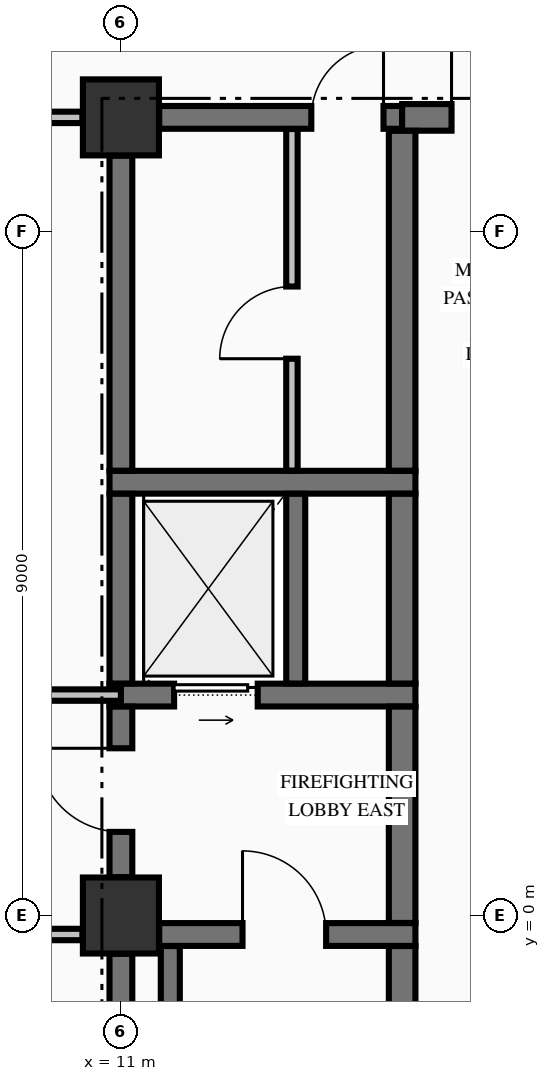
"""IFC4 building model, lengths in metres.
Left out: names, types, materials, properties, quantities, classifications, styles, units other than length and angle.
Written with IfcOpenShell. Run it as: python <this file> out.ifc"""

import sys

from ifc_helpers import new_model, si_unit, direction, frame, frame_2d, origin, origin_2d, place, context, subcontext, project, spatial, rectangle, extrude, element, fill, save


model = new_model("IFC4")
c1 = context("Model", 3, precision=1e-05, world=origin(), true_north=direction((0.0, 1.0)))
c2 = subcontext(c1, "Body", "Model", "MODEL_VIEW")
j1 = project(units=[si_unit("LENGTHUNIT", "METRE"), si_unit("PLANEANGLEUNIT", "RADIAN")], contexts=[c1])
p1 = place(None, origin())
s1 = spatial("IfcSite", under=j1, at=p1, CompositionType="ELEMENT")
p2 = place(p1, origin())
s2 = spatial("IfcBuilding", under=s1, at=p2, CompositionType="ELEMENT")
p3 = place(p2, frame((0.0, 0.0, 128.49)))
s3 = spatial("IfcBuildingStorey", under=s2, at=p3, CompositionType="ELEMENT", Elevation=128.49)
for number, where, z_axis, x_axis in (
    (1, (11.0, 0.0, -0.25), (0.0, 0.0, 1.0), (1.0, 0.0, 0.0)),
    (2, (11.0, 10.5, -0.25), (0.0, 0.0, 1.0), (1.0, 0.0, 0.0)),
):
    element("IfcColumn", number, at=place(p3, frame(where, z_axis=z_axis, x_axis=x_axis)), inside=s3, PredefinedType="COLUMN", context=c2, shape_type="SweptSolid", body=[
        extrude(rectangle(XDim=1.0, YDim=1.0, at=origin_2d()), origin(), (0.0, 0.0, 1.0), 3.57),
    ])
p4 = place(p3, frame((11.504, -0.25, 0.0), z_axis=(0.0, 0.0, 1.0), x_axis=(1.0, 0.0, 0.0)))
e3 = element("IfcWall", 3, at=p4, inside=s3, PredefinedType="SHEAR", context=c2, shape_type="SweptSolid", body=[
    extrude(rectangle(XDim=3.371, YDim=0.3, at=frame_2d((1.686, 0.0))), origin(), (0.0, 0.0, 1.0), 3.32),
])
p5 = place(p4, frame((1.096, 0.0, 0.0)))
e4 = element("IfcOpeningElement", 4, at=p5, cuts=e3, PredefinedType="OPENING", context=c2, shape_type="SweptSolid", body=[
    extrude(rectangle(XDim=1.1, YDim=2.15, at=frame_2d((0.55, 1.075))), frame((0.0, 0.16, 0.0), z_axis=(0.0, -1.0, 0.0), x_axis=(1.0, 0.0, 0.0)), (0.0, 0.0, 1.0), 0.32),
])
p6 = place(p3, frame((10.85, 2.9, 0.0), z_axis=(0.0, 0.0, 1.0), x_axis=(1.0, 0.0, 0.0)))
e5 = element("IfcWall", 5, at=p6, inside=s3, PredefinedType="SHEAR", context=c2, shape_type="SweptSolid", body=[
    extrude(rectangle(XDim=4.025, YDim=0.3, at=frame_2d((2.012, 0.0))), origin(), (0.0, 0.0, 1.0), 3.32),
])
p7 = place(p6, frame((0.85, 0.0, 0.0)))
e6 = element("IfcOpeningElement", 6, at=p7, cuts=e5, PredefinedType="OPENING", context=c2, shape_type="SweptSolid", body=[
    extrude(rectangle(XDim=1.1, YDim=2.2, at=frame_2d((0.55, 1.1))), frame((0.0, 0.16, 0.0), z_axis=(0.0, -1.0, 0.0), x_axis=(1.0, 0.0, 0.0)), (0.0, 0.0, 1.0), 0.32),
])
p8 = place(p3, frame((10.85, 5.7, 0.0), z_axis=(0.0, 0.0, 1.0), x_axis=(1.0, 0.0, 0.0)))
e7 = element("IfcWall", 7, at=p8, inside=s3, PredefinedType="SHEAR", context=c2, shape_type="SweptSolid", body=[
    extrude(rectangle(XDim=4.025, YDim=0.3, at=frame_2d((2.012, 0.0))), origin(), (0.0, 0.0, 1.0), 3.32),
])
p9 = place(p3, frame((11.504, 10.5, 0.0), z_axis=(0.0, 0.0, 1.0), x_axis=(1.0, 0.0, 0.0)))
e8 = element("IfcWall", 8, at=p9, inside=s3, PredefinedType="SHEAR", context=c2, shape_type="SweptSolid", body=[
    extrude(rectangle(XDim=3.196, YDim=0.3, at=frame_2d((1.598, 0.0))), origin(), (0.0, 0.0, 1.0), 3.32),
])
p10 = place(p9, frame((2.001, 0.0, 0.0)))
e9 = element("IfcOpeningElement", 9, at=p10, cuts=e8, PredefinedType="OPENING", context=c2, shape_type="SweptSolid", body=[
    extrude(rectangle(XDim=0.95, YDim=2.15, at=frame_2d((0.475, 1.075))), frame((0.0, 0.16, 0.0), z_axis=(0.0, -1.0, 0.0), x_axis=(1.0, 0.0, 0.0)), (0.0, 0.0, 1.0), 0.32),
])
p11 = place(p3, frame((14.7, 10.5, 0.0), z_axis=(0.0, 0.0, 1.0), x_axis=(1.0, 0.0, 0.0)))
e10 = element("IfcWall", 10, at=p11, inside=s3, PredefinedType="SHEAR", context=c2, shape_type="SweptSolid", body=[
    extrude(rectangle(XDim=4.796, YDim=0.35, at=frame_2d((2.398, 0.0))), origin(), (0.0, 0.0, 1.0), 3.32),
])
p12 = place(p11, frame((0.65, 0.0, 0.0)))
e11 = element("IfcOpeningElement", 11, at=p12, cuts=e10, PredefinedType="OPENING", context=c2, shape_type="SweptSolid", body=[
    extrude(rectangle(XDim=1.2, YDim=2.15, at=frame_2d((0.6, 1.075))), frame((0.0, 0.185, 0.0), z_axis=(0.0, -1.0, 0.0), x_axis=(1.0, 0.0, 0.0)), (0.0, 0.0, 1.0), 0.37),
])
p13 = place(p11, frame((3.25, 0.0, 0.0)))
e12 = element("IfcOpeningElement", 12, at=p13, cuts=e10, PredefinedType="OPENING", context=c2, shape_type="SweptSolid", body=[
    extrude(rectangle(XDim=0.9, YDim=2.15, at=frame_2d((0.45, 1.075))), frame((0.0, 0.185, 0.0), z_axis=(0.0, -1.0, 0.0), x_axis=(1.0, 0.0, 0.0)), (0.0, 0.0, 1.0), 0.37),
])
p14 = place(p3, frame((-10.494, -0.25, 0.0), z_axis=(0.0, 0.0, 1.0), x_axis=(1.0, 0.0, 0.0)))
e13 = element("IfcWall", 13, at=p14, inside=s3, PredefinedType="PARTITIONING", context=c2, shape_type="SweptSolid", body=[
    extrude(rectangle(XDim=20.988, YDim=0.15, at=frame_2d((10.494, 0.0))), origin(), (0.0, 0.0, 1.0), 3.32),
])
p15 = place(p14, frame((5.444, 0.0, 0.0)))
e14 = element("IfcOpeningElement", 14, at=p15, cuts=e13, PredefinedType="OPENING", context=c2, shape_type="SweptSolid", body=[
    extrude(rectangle(XDim=1.1, YDim=2.15, at=frame_2d((0.55, 1.075))), frame((0.0, 0.085, 0.0), z_axis=(0.0, -1.0, 0.0), x_axis=(1.0, 0.0, 0.0)), (0.0, 0.0, 1.0), 0.17),
])
p16 = place(p14, frame((1.669, 0.0, 0.0)))
e15 = element("IfcOpeningElement", 15, at=p16, cuts=e13, PredefinedType="OPENING", context=c2, shape_type="SweptSolid", body=[
    extrude(rectangle(XDim=1.05, YDim=2.15, at=frame_2d((0.525, 1.075))), frame((0.0, 0.085, 0.0), z_axis=(0.0, -1.0, 0.0), x_axis=(1.0, 0.0, 0.0)), (0.0, 0.0, 1.0), 0.17),
])
p17 = place(p14, frame((13.819, 0.0, 0.0)))
e16 = element("IfcOpeningElement", 16, at=p17, cuts=e13, PredefinedType="OPENING", context=c2, shape_type="SweptSolid", body=[
    extrude(rectangle(XDim=0.95, YDim=2.15, at=frame_2d((0.475, 1.075))), frame((0.0, 0.085, 0.0), z_axis=(0.0, -1.0, 0.0), x_axis=(1.0, 0.0, 0.0)), (0.0, 0.0, 1.0), 0.17),
])
p18 = place(p3, frame((-11.0, 2.9, 0.0), z_axis=(0.0, 0.0, 1.0), x_axis=(1.0, 0.0, 0.0)))
e17 = element("IfcWall", 17, at=p18, inside=s3, PredefinedType="PARTITIONING", context=c2, shape_type="SweptSolid", body=[
    extrude(rectangle(XDim=22.0, YDim=0.15, at=frame_2d((11.0, 0.0))), origin(), (0.0, 0.0, 1.0), 3.32),
])
p19 = place(p18, frame((5.95, 0.0, 0.0)))
e18 = element("IfcOpeningElement", 18, at=p19, cuts=e17, PredefinedType="OPENING", context=c2, shape_type="SweptSolid", body=[
    extrude(rectangle(XDim=1.1, YDim=2.15, at=frame_2d((0.55, 1.075))), frame((0.0, 0.085, 0.0), z_axis=(0.0, -1.0, 0.0), x_axis=(1.0, 0.0, 0.0)), (0.0, 0.0, 1.0), 0.17),
])
p20 = place(p18, frame((2.175, 0.0, 0.0)))
e19 = element("IfcOpeningElement", 19, at=p20, cuts=e17, PredefinedType="OPENING", context=c2, shape_type="SweptSolid", body=[
    extrude(rectangle(XDim=1.05, YDim=2.15, at=frame_2d((0.525, 1.075))), frame((0.0, 0.085, 0.0), z_axis=(0.0, -1.0, 0.0), x_axis=(1.0, 0.0, 0.0)), (0.0, 0.0, 1.0), 0.17),
])
p21 = place(p18, frame((14.25, 0.0, 0.0)))
e20 = element("IfcOpeningElement", 20, at=p21, cuts=e17, PredefinedType="OPENING", context=c2, shape_type="SweptSolid", body=[
    extrude(rectangle(XDim=1.1, YDim=2.15, at=frame_2d((0.55, 1.075))), frame((0.0, 0.085, 0.0), z_axis=(0.0, -1.0, 0.0), x_axis=(1.0, 0.0, 0.0)), (0.0, 0.0, 1.0), 0.17),
])
p22 = place(p3, frame((-10.494, 10.5, 0.0), z_axis=(0.0, 0.0, 1.0), x_axis=(1.0, 0.0, 0.0)))
e21 = element("IfcWall", 21, at=p22, inside=s3, PredefinedType="PARTITIONING", context=c2, shape_type="SweptSolid", body=[
    extrude(rectangle(XDim=20.988, YDim=0.15, at=frame_2d((10.494, 0.0))), origin(), (0.0, 0.0, 1.0), 3.32),
])
p23 = place(p22, frame((5.444, 0.0, 0.0)))
e22 = element("IfcOpeningElement", 22, at=p23, cuts=e21, PredefinedType="OPENING", context=c2, shape_type="SweptSolid", body=[
    extrude(rectangle(XDim=1.1, YDim=2.15, at=frame_2d((0.55, 1.075))), frame((0.0, 0.085, 0.0), z_axis=(0.0, -1.0, 0.0), x_axis=(1.0, 0.0, 0.0)), (0.0, 0.0, 1.0), 0.17),
])
p24 = place(p3, frame((11.0, -9.446, 0.0), z_axis=(0.0, 0.0, 1.0), x_axis=(0.0, 1.0, 0.0)))
e23 = element("IfcWall", 23, at=p24, inside=s3, PredefinedType="SHEAR", context=c2, shape_type="SweptSolid", body=[
    extrude(rectangle(XDim=8.942, YDim=0.3, at=frame_2d((4.471, 0.0))), origin(), (0.0, 0.0, 1.0), 3.32),
])
p25 = place(p3, frame((11.0, 0.504, 0.0), z_axis=(0.0, 0.0, 1.0), x_axis=(0.0, 1.0, 0.0)))
e24 = element("IfcWall", 24, at=p25, inside=s3, PredefinedType="SHEAR", context=c2, shape_type="SweptSolid", body=[
    extrude(rectangle(XDim=2.244, YDim=0.3, at=frame_2d((1.122, 0.0))), origin(), (0.0, 0.0, 1.0), 3.32),
])
p26 = place(p25, frame((0.596, 0.0, 0.0)))
e25 = element("IfcOpeningElement", 25, at=p26, cuts=e24, PredefinedType="OPENING", context=c2, shape_type="SweptSolid", body=[
    extrude(rectangle(XDim=1.1, YDim=2.15, at=frame_2d((0.55, 1.075))), frame((0.0, 0.16, 0.0), z_axis=(0.0, -1.0, 0.0), x_axis=(1.0, 0.0, 0.0)), (0.0, 0.0, 1.0), 0.32),
])
p27 = place(p3, frame((11.0, 3.052, 0.0), z_axis=(0.0, 0.0, 1.0), x_axis=(0.0, 1.0, 0.0)))
e26 = element("IfcWall", 26, at=p27, inside=s3, PredefinedType="SHEAR", context=c2, shape_type="SweptSolid", body=[
    extrude(rectangle(XDim=2.496, YDim=0.3, at=frame_2d((1.248, 0.0))), origin(), (0.0, 0.0, 1.0), 3.32),
])
p28 = place(p3, frame((11.0, 5.852, 0.0), z_axis=(0.0, 0.0, 1.0), x_axis=(0.0, 1.0, 0.0)))
e27 = element("IfcWall", 27, at=p28, inside=s3, PredefinedType="SHEAR", context=c2, shape_type="SweptSolid", body=[
    extrude(rectangle(XDim=4.144, YDim=0.3, at=frame_2d((2.072, 0.0))), origin(), (0.0, 0.0, 1.0), 3.32),
])
p29 = place(p3, frame((11.65, -9.798, 0.0), z_axis=(0.0, 0.0, 1.0), x_axis=(0.0, 1.0, 0.0)))
e28 = element("IfcWall", 28, at=p29, inside=s3, PredefinedType="SOLIDWALL", context=c2, shape_type="SweptSolid", body=[
    extrude(rectangle(XDim=9.396, YDim=0.25, at=frame_2d((4.698, 0.0))), origin(), (0.0, 0.0, 1.0), 3.32),
])
p30 = place(p3, frame((13.3, 3.052, 0.0), z_axis=(0.0, 0.0, 1.0), x_axis=(0.0, 1.0, 0.0)))
e29 = element("IfcWall", 29, at=p30, inside=s3, PredefinedType="SOLIDWALL", context=c2, shape_type="SweptSolid", body=[
    extrude(rectangle(XDim=2.496, YDim=0.25, at=frame_2d((1.248, 0.0))), origin(), (0.0, 0.0, 1.0), 3.32),
])
p31 = place(p3, frame((14.7, -9.773, 0.0), z_axis=(0.0, 0.0, 1.0), x_axis=(0.0, 1.0, 0.0)))
e30 = element("IfcWall", 30, at=p31, inside=s3, PredefinedType="SHEAR", context=c2, shape_type="SweptSolid", body=[
    extrude(rectangle(XDim=9.371, YDim=0.35, at=frame_2d((4.686, 0.0))), origin(), (0.0, 0.0, 1.0), 3.32),
])
p32 = place(p3, frame((14.7, -0.098, 0.0), z_axis=(0.0, 0.0, 1.0), x_axis=(0.0, 1.0, 0.0)))
e31 = element("IfcWall", 31, at=p32, inside=s3, PredefinedType="SHEAR", context=c2, shape_type="SweptSolid", body=[
    extrude(rectangle(XDim=2.846, YDim=0.35, at=frame_2d((1.423, 0.0))), origin(), (0.0, 0.0, 1.0), 3.32),
])
p33 = place(p3, frame((14.7, 3.052, 0.0), z_axis=(0.0, 0.0, 1.0), x_axis=(0.0, 1.0, 0.0)))
e32 = element("IfcWall", 32, at=p33, inside=s3, PredefinedType="SHEAR", context=c2, shape_type="SweptSolid", body=[
    extrude(rectangle(XDim=2.496, YDim=0.35, at=frame_2d((1.248, 0.0))), origin(), (0.0, 0.0, 1.0), 3.32),
])
p34 = place(p3, frame((14.7, 5.852, 0.0), z_axis=(0.0, 0.0, 1.0), x_axis=(0.0, 1.0, 0.0)))
e33 = element("IfcWall", 33, at=p34, inside=s3, PredefinedType="SHEAR", context=c2, shape_type="SweptSolid", body=[
    extrude(rectangle(XDim=4.471, YDim=0.35, at=frame_2d((2.235, 0.0))), origin(), (0.0, 0.0, 1.0), 3.32),
])
p35 = place(p3, frame((13.25, 5.853, 0.0), z_axis=(0.0, 0.0, 1.0), x_axis=(0.0, 1.0, 0.0)))
e34 = element("IfcWall", 34, at=p35, inside=s3, PredefinedType="PARTITIONING", context=c2, shape_type="SweptSolid", body=[
    extrude(rectangle(XDim=4.494, YDim=0.15, at=frame_2d((2.247, 0.0))), origin(), (0.0, 0.0, 1.0), 3.32),
])
p36 = place(p35, frame((1.472, 0.0, 0.0)))
e35 = element("IfcOpeningElement", 35, at=p36, cuts=e34, PredefinedType="OPENING", context=c2, shape_type="SweptSolid", body=[
    extrude(rectangle(XDim=0.95, YDim=2.15, at=frame_2d((0.475, 1.075))), frame((0.0, 0.085, 0.0), z_axis=(0.0, -1.0, 0.0), x_axis=(1.0, 0.0, 0.0)), (0.0, 0.0, 1.0), 0.17),
])
p37 = place(p5, origin())
e36 = element("IfcDoor", 36, at=p37, inside=s3, OperationType="SINGLE_SWING_LEFT", PredefinedType="DOOR", context=c2, shape_type="SweptSolid", body=[
    extrude(rectangle(XDim=1.1, YDim=2.15, at=frame_2d((0.55, 1.075))), frame((0.0, 0.025, 0.0), z_axis=(0.0, -1.0, 0.0), x_axis=(1.0, 0.0, 0.0)), (0.0, 0.0, 1.0), 0.05),
])
fill(e4, e36)
p38 = place(p26, origin())
e37 = element("IfcDoor", 37, at=p38, inside=s3, OperationType="SINGLE_SWING_RIGHT", PredefinedType="DOOR", context=c2, shape_type="SweptSolid", body=[
    extrude(rectangle(XDim=1.1, YDim=2.15, at=frame_2d((0.55, 1.075))), frame((0.0, 0.025, 0.0), z_axis=(0.0, -1.0, 0.0), x_axis=(1.0, 0.0, 0.0)), (0.0, 0.0, 1.0), 0.05),
])
fill(e25, e37)
p39 = place(p7, origin())
e38 = element("IfcDoor", 38, at=p39, inside=s3, OperationType="SLIDING_TO_RIGHT", PredefinedType="DOOR", context=c2, shape_type="SweptSolid", body=[
    extrude(rectangle(XDim=1.1, YDim=2.2, at=frame_2d((0.55, 1.1))), frame((0.0, 0.025, 0.0), z_axis=(0.0, -1.0, 0.0), x_axis=(1.0, 0.0, 0.0)), (0.0, 0.0, 1.0), 0.05),
])
fill(e6, e38)
p40 = place(p10, origin())
e39 = element("IfcDoor", 39, at=p40, inside=s3, OperationType="SINGLE_SWING_RIGHT", PredefinedType="DOOR", context=c2, shape_type="SweptSolid", body=[
    extrude(rectangle(XDim=0.95, YDim=2.15, at=frame_2d((0.475, 1.075))), frame((0.0, 0.025, 0.0), z_axis=(0.0, -1.0, 0.0), x_axis=(1.0, 0.0, 0.0)), (0.0, 0.0, 1.0), 0.05),
])
fill(e9, e39)
p41 = place(p36, origin())
e40 = element("IfcDoor", 40, at=p41, inside=s3, OperationType="SINGLE_SWING_LEFT", PredefinedType="DOOR", context=c2, shape_type="SweptSolid", body=[
    extrude(rectangle(XDim=0.95, YDim=2.15, at=frame_2d((0.475, 1.075))), frame((0.0, 0.025, 0.0), z_axis=(0.0, -1.0, 0.0), x_axis=(1.0, 0.0, 0.0)), (0.0, 0.0, 1.0), 0.05),
])
fill(e35, e40)
p42 = place(p12, origin())
e41 = element("IfcDoor", 41, at=p42, inside=s3, OperationType="SINGLE_SWING_LEFT", PredefinedType="DOOR", context=c2, shape_type="SweptSolid", body=[
    extrude(rectangle(XDim=1.2, YDim=2.15, at=frame_2d((0.6, 1.075))), frame((0.0, 0.025, 0.0), z_axis=(0.0, -1.0, 0.0), x_axis=(1.0, 0.0, 0.0)), (0.0, 0.0, 1.0), 0.05),
])
fill(e11, e41)
save(model, sys.argv[1])
